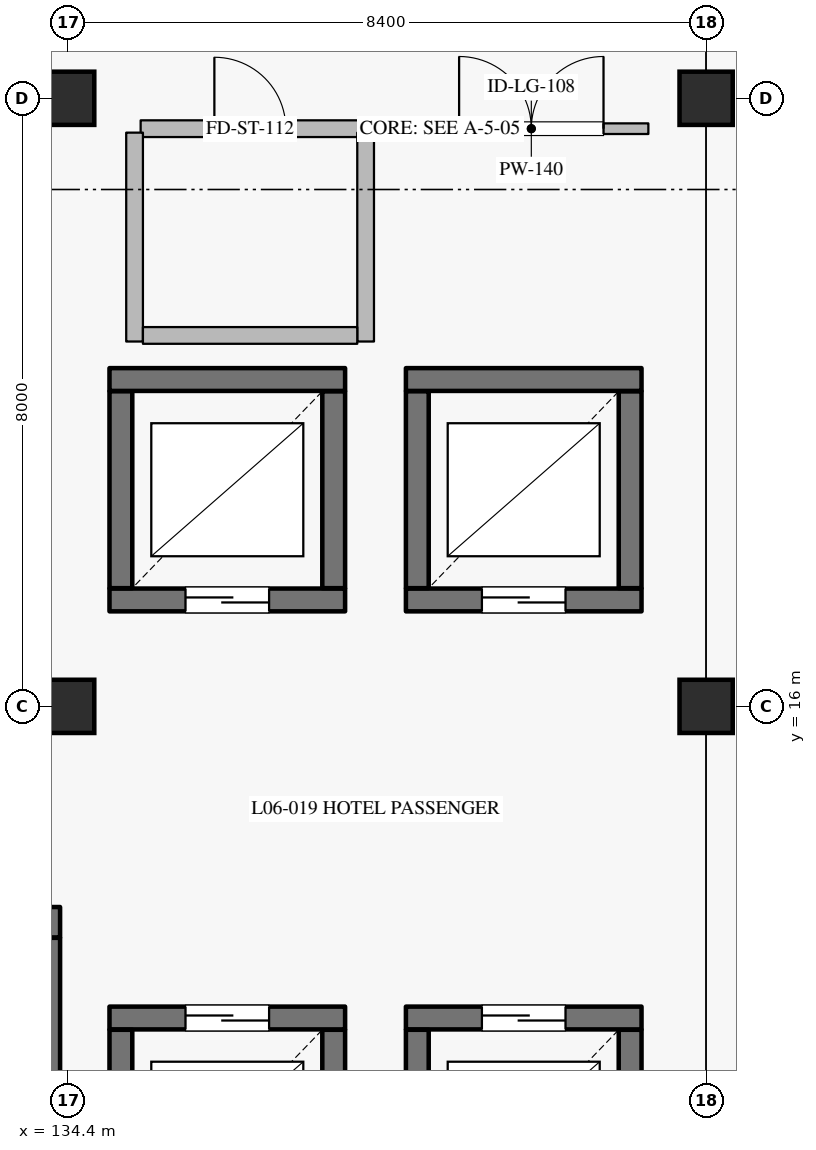
"""IFC4 building model, lengths in metres.
Left out: names, types, materials, properties, quantities, classifications, styles, units other than length and angle.
Written with IfcOpenShell. Run it as: python <this file> out.ifc"""

import sys

from ifc_helpers import new_model, si_unit, direction, frame, frame_2d, origin, origin_2d, place, context, subcontext, project, spatial, rectangle, extrude, element, fill, save


model = new_model("IFC4")
c1 = context("Model", 3, precision=1e-05, world=origin(), true_north=direction((0.0, 1.0)))
c2 = subcontext(c1, "Body", "Model", "MODEL_VIEW")
j1 = project(units=[si_unit("LENGTHUNIT", "METRE"), si_unit("PLANEANGLEUNIT", "RADIAN")], contexts=[c1])
p1 = place(None, origin())
s1 = spatial("IfcSite", under=j1, at=p1, CompositionType="ELEMENT")
p2 = place(p1, origin())
s2 = spatial("IfcBuilding", under=s1, at=p2, CompositionType="ELEMENT")
p3 = place(p2, frame((0.0, 0.0, 28.8)))
s3 = spatial("IfcBuildingStorey", under=s2, at=p3, CompositionType="ELEMENT", Elevation=28.8)
for number, where, z_axis, x_axis in (
    (1, (134.4, 16.0, 0.0), (0.0, 0.0, 1.0), (1.0, 0.0, 0.0)),
    (2, (142.8, 16.0, 0.0), (0.0, 0.0, 1.0), (1.0, 0.0, 0.0)),
    (3, (134.4, 24.0, 0.0), (0.0, 0.0, 1.0), (1.0, 0.0, 0.0)),
    (4, (142.8, 24.0, 0.0), (0.0, 0.0, 1.0), (1.0, 0.0, 0.0)),
):
    element("IfcColumn", number, at=place(p3, frame(where, z_axis=z_axis, x_axis=x_axis)), inside=s3, PredefinedType="COLUMN", context=c2, shape_type="SweptSolid", body=[
        extrude(rectangle(XDim=0.7, YDim=0.7, at=origin_2d()), origin(), (0.0, 0.0, 1.0), 3.6),
    ])
p4 = place(p3, frame((134.95, 17.4, 0.0), z_axis=(0.0, 0.0, 1.0), x_axis=(1.0, 0.0, 0.0)))
e5 = element("IfcWall", 5, at=p4, inside=s3, PredefinedType="SHEAR", context=c2, shape_type="SweptSolid", body=[
    extrude(rectangle(XDim=3.1, YDim=0.3, at=frame_2d((1.55, 0.0))), origin(), (0.0, 0.0, 1.0), 3.365),
])
p5 = place(p4, frame((1.0, 0.0, 0.0)))
e6 = element("IfcOpeningElement", 6, at=p5, cuts=e5, PredefinedType="OPENING", context=c2, shape_type="SweptSolid", body=[
    extrude(rectangle(XDim=1.1, YDim=2.2, at=frame_2d((0.55, 1.1))), frame((0.0, 0.16, 0.0), z_axis=(0.0, -1.0, 0.0), x_axis=(1.0, 0.0, 0.0)), (0.0, 0.0, 1.0), 0.32),
])
p6 = place(p3, frame((137.9, 17.555, 0.0), z_axis=(0.0, 0.0, 1.0), x_axis=(0.0, 1.0, 0.0)))
e7 = element("IfcWall", 7, at=p6, inside=s3, PredefinedType="SHEAR", context=c2, shape_type="SweptSolid", body=[
    extrude(rectangle(XDim=2.59, YDim=0.3, at=frame_2d((1.295, 0.0))), origin(), (0.0, 0.0, 1.0), 3.365),
])
p7 = place(p3, frame((138.05, 20.3, 0.0), z_axis=(0.0, 0.0, 1.0), x_axis=(-1.0, 0.0, 0.0)))
e8 = element("IfcWall", 8, at=p7, inside=s3, PredefinedType="SHEAR", context=c2, shape_type="SweptSolid", body=[
    extrude(rectangle(XDim=3.1, YDim=0.3, at=frame_2d((1.55, 0.0))), origin(), (0.0, 0.0, 1.0), 3.365),
])
p8 = place(p3, frame((135.1, 20.145, 0.0), z_axis=(0.0, 0.0, 1.0), x_axis=(0.0, -1.0, 0.0)))
e9 = element("IfcWall", 9, at=p8, inside=s3, PredefinedType="SHEAR", context=c2, shape_type="SweptSolid", body=[
    extrude(rectangle(XDim=2.59, YDim=0.3, at=frame_2d((1.295, 0.0))), origin(), (0.0, 0.0, 1.0), 3.365),
])
p9 = place(p3, frame((138.85, 17.4, 0.0), z_axis=(0.0, 0.0, 1.0), x_axis=(1.0, 0.0, 0.0)))
e10 = element("IfcWall", 10, at=p9, inside=s3, PredefinedType="SHEAR", context=c2, shape_type="SweptSolid", body=[
    extrude(rectangle(XDim=3.1, YDim=0.3, at=frame_2d((1.55, 0.0))), origin(), (0.0, 0.0, 1.0), 3.365),
])
p10 = place(p9, frame((1.0, 0.0, 0.0)))
e11 = element("IfcOpeningElement", 11, at=p10, cuts=e10, PredefinedType="OPENING", context=c2, shape_type="SweptSolid", body=[
    extrude(rectangle(XDim=1.1, YDim=2.2, at=frame_2d((0.55, 1.1))), frame((0.0, 0.16, 0.0), z_axis=(0.0, -1.0, 0.0), x_axis=(1.0, 0.0, 0.0)), (0.0, 0.0, 1.0), 0.32),
])
p11 = place(p3, frame((141.8, 17.555, 0.0), z_axis=(0.0, 0.0, 1.0), x_axis=(0.0, 1.0, 0.0)))
e12 = element("IfcWall", 12, at=p11, inside=s3, PredefinedType="SHEAR", context=c2, shape_type="SweptSolid", body=[
    extrude(rectangle(XDim=2.59, YDim=0.3, at=frame_2d((1.295, 0.0))), origin(), (0.0, 0.0, 1.0), 3.365),
])
p12 = place(p3, frame((141.95, 20.3, 0.0), z_axis=(0.0, 0.0, 1.0), x_axis=(-1.0, 0.0, 0.0)))
e13 = element("IfcWall", 13, at=p12, inside=s3, PredefinedType="SHEAR", context=c2, shape_type="SweptSolid", body=[
    extrude(rectangle(XDim=3.1, YDim=0.3, at=frame_2d((1.55, 0.0))), origin(), (0.0, 0.0, 1.0), 3.365),
])
for number, where, z_axis, x_axis in (
    (14, (139.0, 20.145, 0.0), (0.0, 0.0, 1.0), (0.0, -1.0, 0.0)),
    (15, (137.9, 9.155, 0.0), (0.0, 0.0, 1.0), (0.0, 1.0, 0.0)),
):
    element("IfcWall", number, at=place(p3, frame(where, z_axis=z_axis, x_axis=x_axis)), inside=s3, PredefinedType="SHEAR", context=c2, shape_type="SweptSolid", body=[
        extrude(rectangle(XDim=2.59, YDim=0.3, at=frame_2d((1.295, 0.0))), origin(), (0.0, 0.0, 1.0), 3.365),
    ])
p13 = place(p3, frame((138.05, 11.9, 0.0), z_axis=(0.0, 0.0, 1.0), x_axis=(-1.0, 0.0, 0.0)))
e16 = element("IfcWall", 16, at=p13, inside=s3, PredefinedType="SHEAR", context=c2, shape_type="SweptSolid", body=[
    extrude(rectangle(XDim=3.1, YDim=0.3, at=frame_2d((1.55, 0.0))), origin(), (0.0, 0.0, 1.0), 3.365),
])
p14 = place(p13, frame((1.0, 0.0, 0.0)))
e17 = element("IfcOpeningElement", 17, at=p14, cuts=e16, PredefinedType="OPENING", context=c2, shape_type="SweptSolid", body=[
    extrude(rectangle(XDim=1.1, YDim=2.2, at=frame_2d((0.55, 1.1))), frame((0.0, 0.16, 0.0), z_axis=(0.0, -1.0, 0.0), x_axis=(1.0, 0.0, 0.0)), (0.0, 0.0, 1.0), 0.32),
])
for number, where, z_axis, x_axis in (
    (18, (135.1, 11.745, 0.0), (0.0, 0.0, 1.0), (0.0, -1.0, 0.0)),
    (19, (141.8, 9.155, 0.0), (0.0, 0.0, 1.0), (0.0, 1.0, 0.0)),
):
    element("IfcWall", number, at=place(p3, frame(where, z_axis=z_axis, x_axis=x_axis)), inside=s3, PredefinedType="SHEAR", context=c2, shape_type="SweptSolid", body=[
        extrude(rectangle(XDim=2.59, YDim=0.3, at=frame_2d((1.295, 0.0))), origin(), (0.0, 0.0, 1.0), 3.365),
    ])
p15 = place(p3, frame((141.95, 11.9, 0.0), z_axis=(0.0, 0.0, 1.0), x_axis=(-1.0, 0.0, 0.0)))
e20 = element("IfcWall", 20, at=p15, inside=s3, PredefinedType="SHEAR", context=c2, shape_type="SweptSolid", body=[
    extrude(rectangle(XDim=3.1, YDim=0.3, at=frame_2d((1.55, 0.0))), origin(), (0.0, 0.0, 1.0), 3.365),
])
p16 = place(p15, frame((1.0, 0.0, 0.0)))
e21 = element("IfcOpeningElement", 21, at=p16, cuts=e20, PredefinedType="OPENING", context=c2, shape_type="SweptSolid", body=[
    extrude(rectangle(XDim=1.1, YDim=2.2, at=frame_2d((0.55, 1.1))), frame((0.0, 0.16, 0.0), z_axis=(0.0, -1.0, 0.0), x_axis=(1.0, 0.0, 0.0)), (0.0, 0.0, 1.0), 0.32),
])
p17 = place(p3, frame((139.0, 11.745, 0.0), z_axis=(0.0, 0.0, 1.0), x_axis=(0.0, -1.0, 0.0)))
e22 = element("IfcWall", 22, at=p17, inside=s3, PredefinedType="SHEAR", context=c2, shape_type="SweptSolid", body=[
    extrude(rectangle(XDim=2.59, YDim=0.3, at=frame_2d((1.295, 0.0))), origin(), (0.0, 0.0, 1.0), 3.365),
])
p18 = place(p3, frame((134.1, 9.005, 0.0), z_axis=(0.0, 0.0, 1.0), x_axis=(0.0, 1.0, 0.0)))
e23 = element("IfcWall", 23, at=p18, inside=s3, PredefinedType="SHEAR", context=c2, shape_type="SweptSolid", body=[
    extrude(rectangle(XDim=3.95, YDim=0.4, at=frame_2d((1.975, 0.0))), origin(), (0.0, 0.0, 1.0), 3.365),
])
p19 = place(p3, frame((126.1, 13.16, 0.0), z_axis=(0.0, 0.0, 1.0), x_axis=(1.0, 0.0, 0.0)))
e24 = element("IfcWall", 24, at=p19, inside=s3, PredefinedType="SHEAR", context=c2, shape_type="SweptSolid", body=[
    extrude(rectangle(XDim=8.2, YDim=0.4, at=frame_2d((4.1, 0.0))), origin(), (0.0, 0.0, 1.0), 3.365),
])
p20 = place(p19, frame((0.43, 0.0, 0.0)))
e25 = element("IfcOpeningElement", 25, at=p20, cuts=e24, PredefinedType="OPENING", context=c2, shape_type="SweptSolid", body=[
    extrude(rectangle(XDim=1.16, YDim=2.2, at=frame_2d((0.58, 1.1))), frame((0.0, 0.21, 0.0), z_axis=(0.0, -1.0, 0.0), x_axis=(1.0, 0.0, 0.0)), (0.0, 0.0, 1.0), 0.42),
])
p21 = place(p3, frame((138.96, 23.6, 0.0), z_axis=(0.0, 0.0, 1.0), x_axis=(1.0, 0.0, 0.0)))
e26 = element("IfcWall", 26, at=p21, inside=s3, PredefinedType="PARTITIONING", context=c2, shape_type="SweptSolid", body=[
    extrude(rectangle(XDim=3.08, YDim=0.14, at=frame_2d((1.54, 0.0))), origin(), (0.0, 0.0, 1.0), 3.365),
])
p22 = place(p21, frame((0.59, 0.0, 0.0)))
e27 = element("IfcOpeningElement", 27, at=p22, cuts=e26, PredefinedType="OPENING", context=c2, shape_type="SweptSolid", body=[
    extrude(rectangle(XDim=1.9, YDim=2.4, at=frame_2d((0.95, 1.2))), frame((0.0, 0.08, 0.0), z_axis=(0.0, -1.0, 0.0), x_axis=(1.0, 0.0, 0.0)), (0.0, 0.0, 1.0), 0.16),
])
p23 = place(p3, frame((135.36, 23.6, 0.0), z_axis=(0.0, 0.0, 1.0), x_axis=(1.0, 0.0, 0.0)))
e28 = element("IfcWall", 28, at=p23, inside=s3, PredefinedType="PARTITIONING", context=c2, shape_type="SweptSolid", body=[
    extrude(rectangle(XDim=2.88, YDim=0.22, at=frame_2d((1.44, 0.0))), origin(), (0.0, 0.0, 1.0), 3.365),
])
p24 = place(p23, frame((0.97, 0.0, 0.0)))
e29 = element("IfcOpeningElement", 29, at=p24, cuts=e28, PredefinedType="OPENING", context=c2, shape_type="SweptSolid", body=[
    extrude(rectangle(XDim=0.94, YDim=2.15, at=frame_2d((0.47, 1.075))), frame((0.0, 0.12, 0.0), z_axis=(0.0, -1.0, 0.0), x_axis=(1.0, 0.0, 0.0)), (0.0, 0.0, 1.0), 0.24),
])
for number, where, z_axis, x_axis in (
    (30, (135.28, 20.8, 0.0), (0.0, 0.0, 1.0), (0.0, 1.0, 0.0)),
    (31, (138.32, 20.8, 0.0), (0.0, 0.0, 1.0), (0.0, 1.0, 0.0)),
):
    element("IfcWall", number, at=place(p3, frame(where, z_axis=z_axis, x_axis=x_axis)), inside=s3, PredefinedType="PARTITIONING", context=c2, shape_type="SweptSolid", body=[
        extrude(rectangle(XDim=2.748, YDim=0.22, at=frame_2d((1.374, 0.0))), origin(), (0.0, 0.0, 1.0), 3.365),
    ])
p25 = place(p3, frame((135.39, 20.88, 0.0), z_axis=(0.0, 0.0, 1.0), x_axis=(1.0, 0.0, 0.0)))
e32 = element("IfcWall", 32, at=p25, inside=s3, PredefinedType="PARTITIONING", context=c2, shape_type="SweptSolid", body=[
    extrude(rectangle(XDim=2.82, YDim=0.22, at=frame_2d((1.41, 0.0))), origin(), (0.0, 0.0, 1.0), 3.365),
])
p26 = place(p5, origin())
e33 = element("IfcDoor", 33, at=p26, inside=s3, OperationType="DOUBLE_DOOR_SLIDING", PredefinedType="DOOR", context=c2, shape_type="SweptSolid", body=[
    extrude(rectangle(XDim=1.1, YDim=2.2, at=frame_2d((0.55, 1.1))), frame((0.0, 0.025, 0.0), z_axis=(0.0, -1.0, 0.0), x_axis=(1.0, 0.0, 0.0)), (0.0, 0.0, 1.0), 0.05),
])
fill(e6, e33)
p27 = place(p10, origin())
e34 = element("IfcDoor", 34, at=p27, inside=s3, OperationType="DOUBLE_DOOR_SLIDING", PredefinedType="DOOR", context=c2, shape_type="SweptSolid", body=[
    extrude(rectangle(XDim=1.1, YDim=2.2, at=frame_2d((0.55, 1.1))), frame((0.0, 0.025, 0.0), z_axis=(0.0, -1.0, 0.0), x_axis=(1.0, 0.0, 0.0)), (0.0, 0.0, 1.0), 0.05),
])
fill(e11, e34)
p28 = place(p14, origin())
e35 = element("IfcDoor", 35, at=p28, inside=s3, OperationType="DOUBLE_DOOR_SLIDING", PredefinedType="DOOR", context=c2, shape_type="SweptSolid", body=[
    extrude(rectangle(XDim=1.1, YDim=2.2, at=frame_2d((0.55, 1.1))), frame((0.0, 0.025, 0.0), z_axis=(0.0, -1.0, 0.0), x_axis=(1.0, 0.0, 0.0)), (0.0, 0.0, 1.0), 0.05),
])
fill(e17, e35)
p29 = place(p16, origin())
e36 = element("IfcDoor", 36, at=p29, inside=s3, OperationType="DOUBLE_DOOR_SLIDING", PredefinedType="DOOR", context=c2, shape_type="SweptSolid", body=[
    extrude(rectangle(XDim=1.1, YDim=2.2, at=frame_2d((0.55, 1.1))), frame((0.0, 0.025, 0.0), z_axis=(0.0, -1.0, 0.0), x_axis=(1.0, 0.0, 0.0)), (0.0, 0.0, 1.0), 0.05),
])
fill(e21, e36)
p30 = place(p22, origin())
e37 = element("IfcDoor", 37, at=p30, inside=s3, OperationType="DOUBLE_DOOR_SINGLE_SWING", PredefinedType="DOOR", context=c2, shape_type="SweptSolid", body=[
    extrude(rectangle(XDim=1.9, YDim=2.4, at=frame_2d((0.95, 1.2))), frame((0.0, 0.025, 0.0), z_axis=(0.0, -1.0, 0.0), x_axis=(1.0, 0.0, 0.0)), (0.0, 0.0, 1.0), 0.05),
])
fill(e27, e37)
p31 = place(p24, origin())
e38 = element("IfcDoor", 38, at=p31, inside=s3, OperationType="SINGLE_SWING_LEFT", PredefinedType="DOOR", context=c2, shape_type="SweptSolid", body=[
    extrude(rectangle(XDim=0.94, YDim=2.15, at=frame_2d((0.47, 1.075))), frame((0.0, 0.025, 0.0), z_axis=(0.0, -1.0, 0.0), x_axis=(1.0, 0.0, 0.0)), (0.0, 0.0, 1.0), 0.05),
])
fill(e29, e38)
save(model, sys.argv[1])
